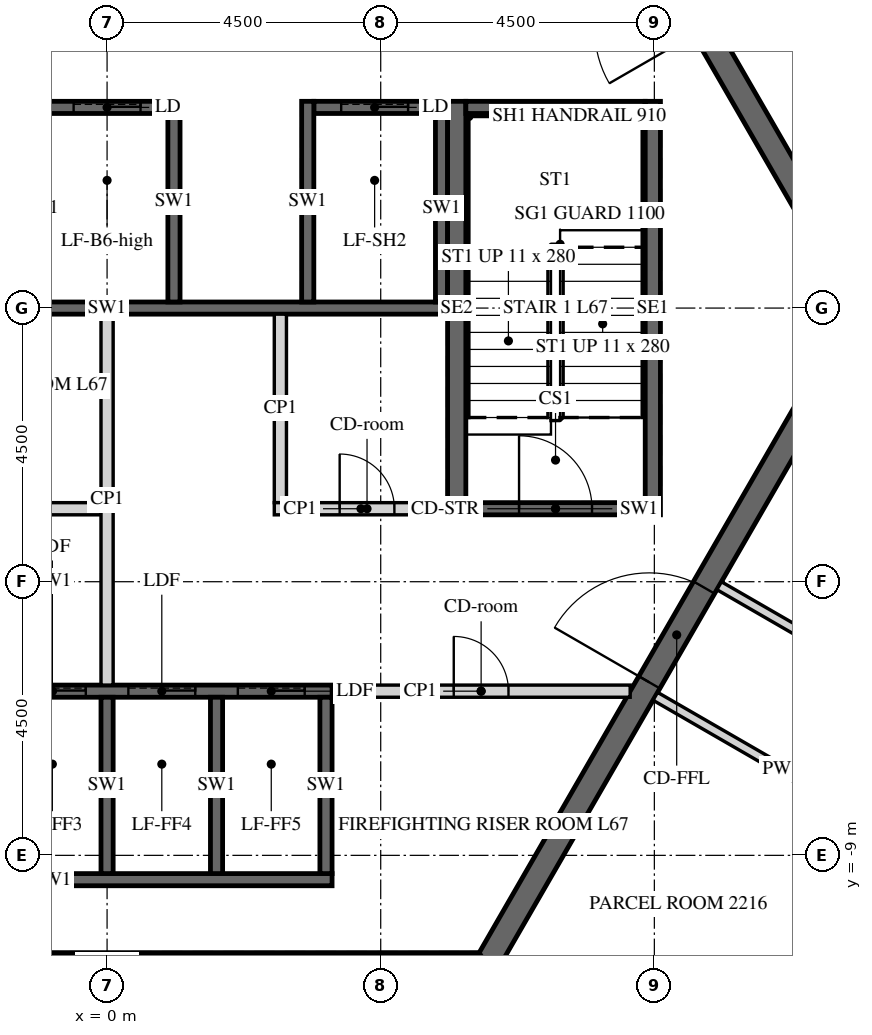
"""IFC4 building model, lengths in metres.
Left out: names, types, materials, properties, quantities, classifications, styles, units other than length and angle.
Written with IfcOpenShell. Run it as: python <this file> out.ifc"""

import sys

from ifc_helpers import new_model, si_unit, direction, frame, frame_2d, origin, place, context, subcontext, project, spatial, polyline, rectangle, outline, extrude, element, fill, save


model = new_model("IFC4")
c1 = context("Model", 3, precision=1e-05, world=origin(), true_north=direction((0.0, 1.0)))
c2 = subcontext(c1, "Body", "Model", "MODEL_VIEW")
j1 = project(units=[si_unit("LENGTHUNIT", "METRE"), si_unit("PLANEANGLEUNIT", "RADIAN")], contexts=[c1])
p1 = place(None, origin())
s1 = spatial("IfcSite", under=j1, at=p1, CompositionType="ELEMENT")
p2 = place(p1, origin())
s2 = spatial("IfcBuilding", under=s1, at=p2, CompositionType="ELEMENT")
p3 = place(p2, frame((0.0, 0.0, 279.6)))
s3 = spatial("IfcBuildingStorey", under=s2, at=p3, CompositionType="ELEMENT", Elevation=279.6)
p4 = place(p3, frame((-6.235, -10.8, -0.15), z_axis=(0.0, 0.0, 1.0), x_axis=(1.0, 0.0, 0.0)))
e1 = element("IfcWall", 1, at=p4, inside=s3, PredefinedType="SHEAR", context=c2, shape_type="SweptSolid", body=[
    extrude(outline(polyline([(-0.115, -0.2), (12.586, -0.2), (12.355, 0.2), (0.115, 0.2), (-0.115, -0.2)])), origin(), (0.0, 0.0, 1.0), 3.9),
])
p5 = place(p3, frame((6.235, -10.8, -0.15), z_axis=(0.0, 0.0, 1.0), x_axis=(0.499996419489, 0.866027470984, 0.0)))
e2 = element("IfcWall", 2, at=p5, inside=s3, PredefinedType="SHEAR", context=c2, shape_type="SweptSolid", body=[
    extrude(outline(polyline([(-0.115, -0.2), (12.586, -0.2), (12.355, 0.2), (0.115, 0.2), (-0.115, -0.2)])), origin(), (0.0, 0.0, 1.0), 3.9),
])
p6 = place(p5, frame((5.364, 0.0, 0.15)))
e3 = element("IfcOpeningElement", 3, at=p6, cuts=e2, PredefinedType="OPENING", context=c2, shape_type="SweptSolid", body=[
    extrude(rectangle(XDim=1.8, YDim=2.4, at=frame_2d((0.9, 1.2))), frame((0.0, 0.21, 0.0), z_axis=(0.0, -1.0, 0.0), x_axis=(1.0, 0.0, 0.0)), (0.0, 0.0, 1.0), 0.42),
])
p7 = place(p3, frame((12.471, 0.0, -0.15), z_axis=(0.0, 0.0, 1.0), x_axis=(-0.499996419489, 0.866027470984, 0.0)))
e4 = element("IfcWall", 4, at=p7, inside=s3, PredefinedType="SHEAR", context=c2, shape_type="SweptSolid", body=[
    extrude(outline(polyline([(-0.115, -0.2), (12.586, -0.2), (12.355, 0.2), (0.115, 0.2), (-0.115, -0.2)])), origin(), (0.0, 0.0, 1.0), 3.9),
])
p8 = place(p7, frame((5.306, 0.0, 0.15)))
e5 = element("IfcOpeningElement", 5, at=p8, cuts=e4, PredefinedType="OPENING", context=c2, shape_type="SweptSolid", body=[
    extrude(rectangle(XDim=1.8, YDim=2.4, at=frame_2d((0.9, 1.2))), frame((0.0, 0.21, 0.0), z_axis=(0.0, -1.0, 0.0), x_axis=(1.0, 0.0, 0.0)), (0.0, 0.0, 1.0), 0.42),
])
p9 = place(p3, frame((-5.6, 3.3, -0.25), z_axis=(0.0, 0.0, 1.0), x_axis=(1.0, 0.0, 0.0)))
e6 = element("IfcWall", 6, at=p9, inside=s3, PredefinedType="SHEAR", context=c2, shape_type="SweptSolid", body=[
    extrude(rectangle(XDim=6.6, YDim=0.2, at=frame_2d((3.3, 0.0))), origin(), (0.0, 0.0, 1.0), 3.9),
])
p10 = place(p9, frame((0.65, 0.0, 0.25)))
e7 = element("IfcOpeningElement", 7, at=p10, cuts=e6, PredefinedType="OPENING", context=c2, shape_type="SweptSolid", body=[
    extrude(rectangle(XDim=1.1, YDim=2.1, at=frame_2d((0.55, 1.05))), frame((0.0, 0.11, 0.0), z_axis=(0.0, -1.0, 0.0), x_axis=(1.0, 0.0, 0.0)), (0.0, 0.0, 1.0), 0.22),
])
p11 = place(p9, frame((2.85, 0.0, 0.25)))
e8 = element("IfcOpeningElement", 8, at=p11, cuts=e6, PredefinedType="OPENING", context=c2, shape_type="SweptSolid", body=[
    extrude(rectangle(XDim=1.1, YDim=2.1, at=frame_2d((0.55, 1.05))), frame((0.0, 0.11, 0.0), z_axis=(0.0, -1.0, 0.0), x_axis=(1.0, 0.0, 0.0)), (0.0, 0.0, 1.0), 0.22),
])
p12 = place(p9, frame((5.05, 0.0, 0.25)))
e9 = element("IfcOpeningElement", 9, at=p12, cuts=e6, PredefinedType="OPENING", context=c2, shape_type="SweptSolid", body=[
    extrude(rectangle(XDim=1.1, YDim=2.1, at=frame_2d((0.55, 1.05))), frame((0.0, 0.11, 0.0), z_axis=(0.0, -1.0, 0.0), x_axis=(1.0, 0.0, 0.0)), (0.0, 0.0, 1.0), 0.22),
])
p13 = place(p3, frame((3.4, 3.3, -0.25), z_axis=(0.0, 0.0, 1.0), x_axis=(1.0, 0.0, 0.0)))
e10 = element("IfcWall", 10, at=p13, inside=s3, PredefinedType="SHEAR", context=c2, shape_type="SweptSolid", body=[
    extrude(rectangle(XDim=2.2, YDim=0.2, at=frame_2d((1.1, 0.0))), origin(), (0.0, 0.0, 1.0), 3.9),
])
p14 = place(p13, frame((0.45, 0.0, 0.25)))
e11 = element("IfcOpeningElement", 11, at=p14, cuts=e10, PredefinedType="OPENING", context=c2, shape_type="SweptSolid", body=[
    extrude(rectangle(XDim=1.1, YDim=2.1, at=frame_2d((0.55, 1.05))), frame((0.0, 0.11, 0.0), z_axis=(0.0, -1.0, 0.0), x_axis=(1.0, 0.0, 0.0)), (0.0, 0.0, 1.0), 0.22),
])
p15 = place(p3, frame((-5.6, 0.0, -0.25), z_axis=(0.0, 0.0, 1.0), x_axis=(1.0, 0.0, 0.0)))
e12 = element("IfcWall", 12, at=p15, inside=s3, PredefinedType="SHEAR", context=c2, shape_type="SweptSolid", body=[
    extrude(rectangle(XDim=11.2, YDim=0.2, at=frame_2d((5.6, 0.0))), origin(), (0.0, 0.0, 1.0), 3.9),
])
for number, where, z_axis, x_axis in (
    (13, (1.1, 0.1, -0.25), (0.0, 0.0, 1.0), (0.0, 1.0, 0.0)),
    (14, (3.3, 0.1, -0.25), (0.0, 0.0, 1.0), (0.0, 1.0, 0.0)),
):
    element("IfcWall", number, at=place(p3, frame(where, z_axis=z_axis, x_axis=x_axis)), inside=s3, PredefinedType="SHEAR", context=c2, shape_type="SweptSolid", body=[
        extrude(rectangle(XDim=3.3, YDim=0.2, at=frame_2d((1.65, 0.0))), origin(), (0.0, 0.0, 1.0), 3.9),
    ])
p16 = place(p3, frame((5.5, 0.1, -0.25), z_axis=(0.0, 0.0, 1.0), x_axis=(0.0, 1.0, 0.0)))
e15 = element("IfcWall", 15, at=p16, inside=s3, PredefinedType="SHEAR", context=c2, shape_type="SweptSolid", body=[
    extrude(rectangle(XDim=3.1, YDim=0.2, at=frame_2d((1.55, 0.0))), origin(), (0.0, 0.0, 1.0), 3.9),
])
p17 = place(p3, frame((-5.5, -6.3, -0.25), z_axis=(0.0, 0.0, 1.0), x_axis=(1.0, 0.0, 0.0)))
e16 = element("IfcWall", 16, at=p17, inside=s3, PredefinedType="SHEAR", context=c2, shape_type="SweptSolid", body=[
    extrude(rectangle(XDim=9.2, YDim=0.2, at=frame_2d((4.6, 0.0))), origin(), (0.0, 0.0, 1.0), 3.9),
])
p18 = place(p17, frame((0.45, 0.0, 0.25)))
e17 = element("IfcOpeningElement", 17, at=p18, cuts=e16, PredefinedType="OPENING", context=c2, shape_type="SweptSolid", body=[
    extrude(rectangle(XDim=1.1, YDim=2.1, at=frame_2d((0.55, 1.05))), frame((0.0, 0.11, 0.0), z_axis=(0.0, -1.0, 0.0), x_axis=(1.0, 0.0, 0.0)), (0.0, 0.0, 1.0), 0.22),
])
p19 = place(p17, frame((2.25, 0.0, 0.25)))
e18 = element("IfcOpeningElement", 18, at=p19, cuts=e16, PredefinedType="OPENING", context=c2, shape_type="SweptSolid", body=[
    extrude(rectangle(XDim=1.1, YDim=2.1, at=frame_2d((0.55, 1.05))), frame((0.0, 0.11, 0.0), z_axis=(0.0, -1.0, 0.0), x_axis=(1.0, 0.0, 0.0)), (0.0, 0.0, 1.0), 0.22),
])
p20 = place(p17, frame((4.05, 0.0, 0.25)))
e19 = element("IfcOpeningElement", 19, at=p20, cuts=e16, PredefinedType="OPENING", context=c2, shape_type="SweptSolid", body=[
    extrude(rectangle(XDim=1.1, YDim=2.1, at=frame_2d((0.55, 1.05))), frame((0.0, 0.11, 0.0), z_axis=(0.0, -1.0, 0.0), x_axis=(1.0, 0.0, 0.0)), (0.0, 0.0, 1.0), 0.22),
])
p21 = place(p17, frame((5.85, 0.0, 0.25)))
e20 = element("IfcOpeningElement", 20, at=p21, cuts=e16, PredefinedType="OPENING", context=c2, shape_type="SweptSolid", body=[
    extrude(rectangle(XDim=1.1, YDim=2.1, at=frame_2d((0.55, 1.05))), frame((0.0, 0.11, 0.0), z_axis=(0.0, -1.0, 0.0), x_axis=(1.0, 0.0, 0.0)), (0.0, 0.0, 1.0), 0.22),
])
p22 = place(p17, frame((7.65, 0.0, 0.25)))
e21 = element("IfcOpeningElement", 21, at=p22, cuts=e16, PredefinedType="OPENING", context=c2, shape_type="SweptSolid", body=[
    extrude(rectangle(XDim=1.1, YDim=2.1, at=frame_2d((0.55, 1.05))), frame((0.0, 0.11, 0.0), z_axis=(0.0, -1.0, 0.0), x_axis=(1.0, 0.0, 0.0)), (0.0, 0.0, 1.0), 0.22),
])
p23 = place(p3, frame((-5.5, -9.4, -0.25), z_axis=(0.0, 0.0, 1.0), x_axis=(1.0, 0.0, 0.0)))
e22 = element("IfcWall", 22, at=p23, inside=s3, PredefinedType="SHEAR", context=c2, shape_type="SweptSolid", body=[
    extrude(rectangle(XDim=9.2, YDim=0.2, at=frame_2d((4.6, 0.0))), origin(), (0.0, 0.0, 1.0), 3.9),
])
for number, where, z_axis, x_axis in (
    (23, (0.0, -9.3, -0.25), (0.0, 0.0, 1.0), (0.0, 1.0, 0.0)),
    (24, (1.8, -9.3, -0.25), (0.0, 0.0, 1.0), (0.0, 1.0, 0.0)),
    (25, (3.6, -9.3, -0.25), (0.0, 0.0, 1.0), (0.0, 1.0, 0.0)),
):
    element("IfcWall", number, at=place(p3, frame(where, z_axis=z_axis, x_axis=x_axis)), inside=s3, PredefinedType="SHEAR", context=c2, shape_type="SweptSolid", body=[
        extrude(rectangle(XDim=2.9, YDim=0.2, at=frame_2d((1.45, 0.0))), origin(), (0.0, 0.0, 1.0), 3.9),
    ])
p24 = place(p3, frame((-5.6, -3.3, 0.0), z_axis=(0.0, 0.0, 1.0), x_axis=(1.0, 0.0, 0.0)))
e26 = element("IfcWall", 26, at=p24, inside=s3, PredefinedType="PARTITIONING", context=c2, shape_type="SweptSolid", body=[
    extrude(rectangle(XDim=5.5, YDim=0.2, at=frame_2d((2.75, 0.0))), origin(), (0.0, 0.0, 1.0), 3.65),
])
p25 = place(p24, frame((2.3, 0.0, 0.0)))
e27 = element("IfcOpeningElement", 27, at=p25, cuts=e26, PredefinedType="OPENING", context=c2, shape_type="SweptSolid", body=[
    extrude(rectangle(XDim=0.9, YDim=2.1, at=frame_2d((0.45, 1.05))), frame((0.0, 0.11, 0.0), z_axis=(0.0, -1.0, 0.0), x_axis=(1.0, 0.0, 0.0)), (0.0, 0.0, 1.0), 0.22),
])
p26 = place(p3, frame((2.75, -3.3, 0.0), z_axis=(0.0, 0.0, 1.0), x_axis=(1.0, 0.0, 0.0)))
e28 = element("IfcWall", 28, at=p26, inside=s3, PredefinedType="PARTITIONING", context=c2, shape_type="SweptSolid", body=[
    extrude(rectangle(XDim=2.85, YDim=0.2, at=frame_2d((1.425, 0.0))), origin(), (0.0, 0.0, 1.0), 3.65),
])
p27 = place(p26, frame((1.075, 0.0, 0.0)))
e29 = element("IfcOpeningElement", 29, at=p27, cuts=e28, PredefinedType="OPENING", context=c2, shape_type="SweptSolid", body=[
    extrude(rectangle(XDim=0.9, YDim=2.1, at=frame_2d((0.45, 1.05))), frame((0.0, 0.11, 0.0), z_axis=(0.0, -1.0, 0.0), x_axis=(1.0, 0.0, 0.0)), (0.0, 0.0, 1.0), 0.22),
])
p28 = place(p3, frame((2.85, -3.2, 0.0), z_axis=(0.0, 0.0, 1.0), x_axis=(0.0, 1.0, 0.0)))
e30 = element("IfcWall", 30, at=p28, inside=s3, PredefinedType="PARTITIONING", context=c2, shape_type="SweptSolid", body=[
    extrude(rectangle(XDim=3.1, YDim=0.2, at=frame_2d((1.55, 0.0))), origin(), (0.0, 0.0, 1.0), 3.65),
])
p29 = place(p3, frame((0.0, -6.2, 0.0), z_axis=(0.0, 0.0, 1.0), x_axis=(0.0, 1.0, 0.0)))
e31 = element("IfcWall", 31, at=p29, inside=s3, PredefinedType="PARTITIONING", context=c2, shape_type="SweptSolid", body=[
    extrude(rectangle(XDim=6.1, YDim=0.2, at=frame_2d((3.05, 0.0))), origin(), (0.0, 0.0, 1.0), 3.65),
])
p30 = place(p3, frame((3.7, -6.3, 0.0), z_axis=(0.0, 0.0, 1.0), x_axis=(1.0, 0.0, 0.0)))
e32 = element("IfcWall", 32, at=p30, inside=s3, PredefinedType="PARTITIONING", context=c2, shape_type="SweptSolid", body=[
    extrude(rectangle(XDim=4.903, YDim=0.2, at=frame_2d((2.451, 0.0))), origin(), (0.0, 0.0, 1.0), 3.65),
])
p31 = place(p30, frame((2.001, 0.0, 0.0)))
e33 = element("IfcOpeningElement", 33, at=p31, cuts=e32, PredefinedType="OPENING", context=c2, shape_type="SweptSolid", body=[
    extrude(rectangle(XDim=0.9, YDim=2.1, at=frame_2d((0.45, 1.05))), frame((0.0, 0.11, 0.0), z_axis=(0.0, -1.0, 0.0), x_axis=(1.0, 0.0, 0.0)), (0.0, 0.0, 1.0), 0.22),
])
p32 = place(p3, frame((5.75, -3.4, -0.25), z_axis=(0.0, 0.0, 1.0), x_axis=(0.0, 1.0, 0.0)))
e34 = element("IfcWall", 34, at=p32, inside=s3, PredefinedType="SHEAR", context=c2, shape_type="SweptSolid", body=[
    extrude(rectangle(XDim=6.8, YDim=0.3, at=frame_2d((3.4, 0.0))), origin(), (0.0, 0.0, 1.0), 3.9),
])
p33 = place(p3, frame((8.975, -3.4, -0.25), z_axis=(0.0, 0.0, 1.0), x_axis=(0.0, 1.0, 0.0)))
e35 = element("IfcWall", 35, at=p33, inside=s3, PredefinedType="SHEAR", context=c2, shape_type="SweptSolid", body=[
    extrude(rectangle(XDim=6.8, YDim=0.25, at=frame_2d((3.4, 0.0))), origin(), (0.0, 0.0, 1.0), 3.9),
])
p34 = place(p3, frame((5.9, 3.3, -0.25), z_axis=(0.0, 0.0, 1.0), x_axis=(1.0, 0.0, 0.0)))
e36 = element("IfcWall", 36, at=p34, inside=s3, PredefinedType="SHEAR", context=c2, shape_type="SweptSolid", body=[
    extrude(rectangle(XDim=2.95, YDim=0.2, at=frame_2d((1.475, 0.0))), origin(), (0.0, 0.0, 1.0), 3.9),
])
p35 = place(p3, frame((5.9, -3.3, -0.25), z_axis=(0.0, 0.0, 1.0), x_axis=(1.0, 0.0, 0.0)))
e37 = element("IfcWall", 37, at=p35, inside=s3, PredefinedType="SHEAR", context=c2, shape_type="SweptSolid", body=[
    extrude(rectangle(XDim=2.95, YDim=0.2, at=frame_2d((1.475, 0.0))), origin(), (0.0, 0.0, 1.0), 3.9),
])
p36 = place(p35, frame((0.875, 0.0, 0.25)))
e38 = element("IfcOpeningElement", 38, at=p36, cuts=e37, PredefinedType="OPENING", context=c2, shape_type="SweptSolid", body=[
    extrude(rectangle(XDim=1.2, YDim=2.4, at=frame_2d((0.6, 1.2))), frame((0.0, 0.11, 0.0), z_axis=(0.0, -1.0, 0.0), x_axis=(1.0, 0.0, 0.0)), (0.0, 0.0, 1.0), 0.22),
])
p37 = place(p3, frame((19.228, -1.146, 0.0), z_axis=(0.0, 0.0, 1.0), x_axis=(-0.559173750718, 0.829050490928, 0.0)))
e39 = element("IfcWall", 39, at=p37, inside=s3, PredefinedType="PARTITIONING", context=c2, shape_type="SweptSolid", body=[
    extrude(rectangle(XDim=17.273, YDim=0.15, at=frame_2d((8.637, 0.0))), origin(), (0.0, 0.0, 1.0), 2.988),
])
p38 = place(p37, frame((9.478, 0.0, 0.0)))
e40 = element("IfcOpeningElement", 40, at=p38, cuts=e39, PredefinedType="OPENING", context=c2, shape_type="SweptSolid", body=[
    extrude(rectangle(XDim=1.0, YDim=2.1, at=frame_2d((0.5, 1.05))), frame((0.0, 0.085, 0.0), z_axis=(0.0, -1.0, 0.0), x_axis=(1.0, 0.0, 0.0)), (0.0, 0.0, 1.0), 0.17),
])
p39 = place(p3, frame((14.158, -6.928, 0.0), z_axis=(0.0, 0.0, 1.0), x_axis=(-0.866024684746, 0.500001245408, 0.0)))
e41 = element("IfcWall", 41, at=p39, inside=s3, PredefinedType="PARTITIONING", context=c2, shape_type="SweptSolid", body=[
    extrude(rectangle(XDim=4.725, YDim=0.15, at=frame_2d((2.363, 0.0))), origin(), (0.0, 0.0, 1.0), 2.988),
])
p40 = place(p3, frame((9.016, -6.384, 0.0), z_axis=(0.0, 0.0, 1.0), x_axis=(0.866015339567, -0.500017431331, 0.0)))
e42 = element("IfcWall", 42, at=p40, inside=s3, PredefinedType="PARTITIONING", context=c2, shape_type="SweptSolid", body=[
    extrude(rectangle(XDim=4.8, YDim=0.15, at=frame_2d((2.4, 0.0))), origin(), (0.0, 0.0, 1.0), 2.988),
])
p41 = place(p3, frame((13.135, -8.849, 0.0), z_axis=(0.0, 0.0, 1.0), x_axis=(-0.500024829938, -0.866011067739, 0.0)))
e43 = element("IfcWall", 43, at=p41, inside=s3, PredefinedType="PARTITIONING", context=c2, shape_type="SweptSolid", body=[
    extrude(rectangle(XDim=4.892, YDim=0.15, at=frame_2d((2.446, 0.0))), origin(), (0.0, 0.0, 1.0), 2.988),
])
p42 = place(p41, frame((1.996, 0.0, 0.0)))
e44 = element("IfcOpeningElement", 44, at=p42, cuts=e43, PredefinedType="OPENING", context=c2, shape_type="SweptSolid", body=[
    extrude(rectangle(XDim=0.9, YDim=2.1, at=frame_2d((0.45, 1.05))), frame((0.0, 0.085, 0.0), z_axis=(0.0, -1.0, 0.0), x_axis=(1.0, 0.0, 0.0)), (0.0, 0.0, 1.0), 0.17),
])
p43 = place(p6, origin())
e45 = element("IfcDoor", 45, at=p43, inside=s3, OperationType="DOUBLE_DOOR_SINGLE_SWING", PredefinedType="DOOR", context=c2, shape_type="SweptSolid", body=[
    extrude(rectangle(XDim=1.8, YDim=2.4, at=frame_2d((0.9, 1.2))), frame((0.0, 0.025, 0.0), z_axis=(0.0, -1.0, 0.0), x_axis=(1.0, 0.0, 0.0)), (0.0, 0.0, 1.0), 0.05),
])
fill(e3, e45)
p44 = place(p27, origin())
e46 = element("IfcDoor", 46, at=p44, inside=s3, OperationType="SINGLE_SWING_LEFT", PredefinedType="DOOR", context=c2, shape_type="SweptSolid", body=[
    extrude(rectangle(XDim=0.9, YDim=2.1, at=frame_2d((0.45, 1.05))), frame((0.0, 0.025, 0.0), z_axis=(0.0, -1.0, 0.0), x_axis=(1.0, 0.0, 0.0)), (0.0, 0.0, 1.0), 0.05),
])
fill(e29, e46)
p45 = place(p31, origin())
e47 = element("IfcDoor", 47, at=p45, inside=s3, OperationType="SINGLE_SWING_LEFT", PredefinedType="DOOR", context=c2, shape_type="SweptSolid", body=[
    extrude(rectangle(XDim=0.9, YDim=2.1, at=frame_2d((0.45, 1.05))), frame((0.0, 0.025, 0.0), z_axis=(0.0, -1.0, 0.0), x_axis=(1.0, 0.0, 0.0)), (0.0, 0.0, 1.0), 0.05),
])
fill(e33, e47)
p46 = place(p36, origin())
e48 = element("IfcDoor", 48, at=p46, inside=s3, OperationType="SINGLE_SWING_LEFT", PredefinedType="DOOR", context=c2, shape_type="SweptSolid", body=[
    extrude(rectangle(XDim=1.2, YDim=2.4, at=frame_2d((0.6, 1.2))), frame((0.0, 0.025, 0.0), z_axis=(0.0, -1.0, 0.0), x_axis=(1.0, 0.0, 0.0)), (0.0, 0.0, 1.0), 0.05),
])
fill(e38, e48)
p47 = place(p12, origin())
e49 = element("IfcDoor", 49, at=p47, inside=s3, OperationType="SLIDING_TO_LEFT", PredefinedType="DOOR", context=c2, shape_type="SweptSolid", body=[
    extrude(rectangle(XDim=1.1, YDim=2.1, at=frame_2d((0.55, 1.05))), frame((0.0, 0.025, 0.0), z_axis=(0.0, -1.0, 0.0), x_axis=(1.0, 0.0, 0.0)), (0.0, 0.0, 1.0), 0.05),
])
fill(e9, e49)
p48 = place(p14, origin())
e50 = element("IfcDoor", 50, at=p48, inside=s3, OperationType="SLIDING_TO_LEFT", PredefinedType="DOOR", context=c2, shape_type="SweptSolid", body=[
    extrude(rectangle(XDim=1.1, YDim=2.1, at=frame_2d((0.55, 1.05))), frame((0.0, 0.025, 0.0), z_axis=(0.0, -1.0, 0.0), x_axis=(1.0, 0.0, 0.0)), (0.0, 0.0, 1.0), 0.05),
])
fill(e11, e50)
p49 = place(p20, origin())
e51 = element("IfcDoor", 51, at=p49, inside=s3, OperationType="SLIDING_TO_LEFT", PredefinedType="DOOR", context=c2, shape_type="SweptSolid", body=[
    extrude(rectangle(XDim=1.1, YDim=2.1, at=frame_2d((0.55, 1.05))), frame((0.0, 0.025, 0.0), z_axis=(0.0, -1.0, 0.0), x_axis=(1.0, 0.0, 0.0)), (0.0, 0.0, 1.0), 0.05),
])
fill(e19, e51)
p50 = place(p21, origin())
e52 = element("IfcDoor", 52, at=p50, inside=s3, OperationType="SLIDING_TO_LEFT", PredefinedType="DOOR", context=c2, shape_type="SweptSolid", body=[
    extrude(rectangle(XDim=1.1, YDim=2.1, at=frame_2d((0.55, 1.05))), frame((0.0, 0.025, 0.0), z_axis=(0.0, -1.0, 0.0), x_axis=(1.0, 0.0, 0.0)), (0.0, 0.0, 1.0), 0.05),
])
fill(e20, e52)
p51 = place(p22, origin())
e53 = element("IfcDoor", 53, at=p51, inside=s3, OperationType="SLIDING_TO_LEFT", PredefinedType="DOOR", context=c2, shape_type="SweptSolid", body=[
    extrude(rectangle(XDim=1.1, YDim=2.1, at=frame_2d((0.55, 1.05))), frame((0.0, 0.025, 0.0), z_axis=(0.0, -1.0, 0.0), x_axis=(1.0, 0.0, 0.0)), (0.0, 0.0, 1.0), 0.05),
])
fill(e21, e53)
save(model, sys.argv[1])
